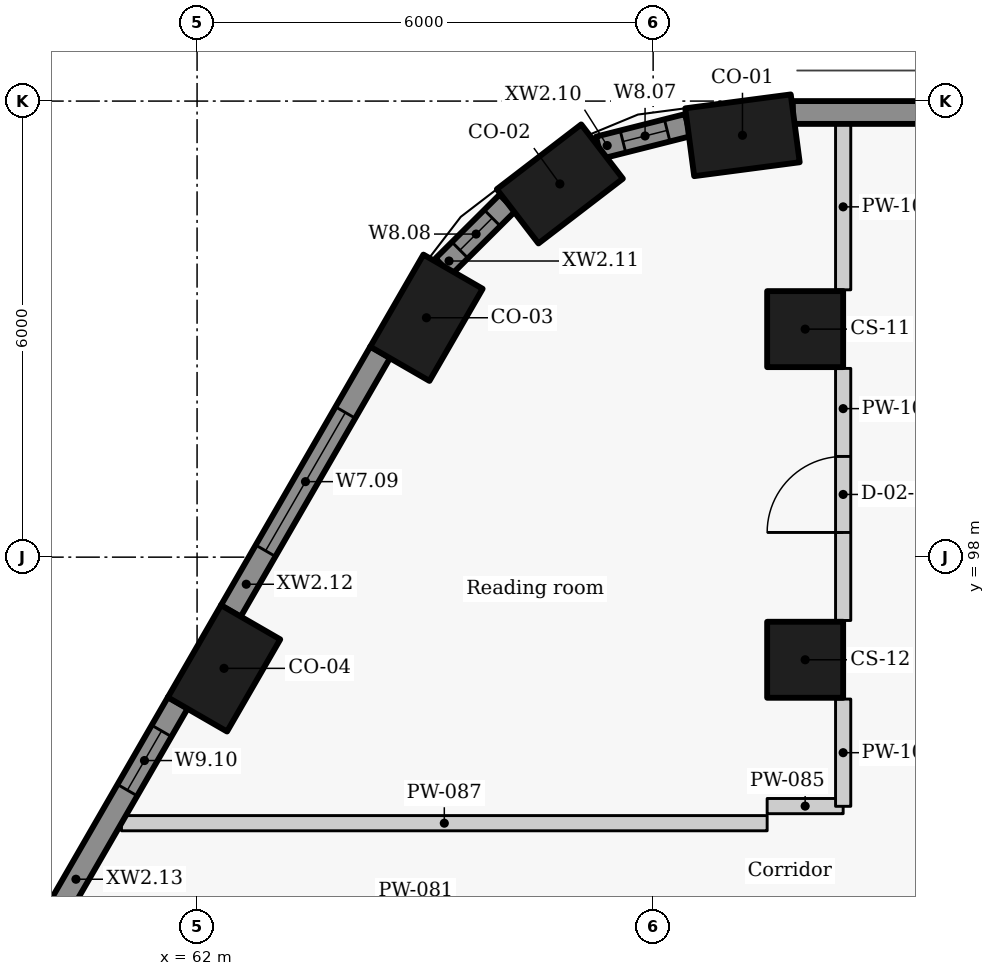
"""IFC4 building model, lengths in metres.
Left out: names, types, materials, properties, quantities, classifications, styles, units other than length and angle.
Written with IfcOpenShell. Run it as: python <this file> out.ifc"""

import sys

from ifc_helpers import new_model, si_unit, direction, frame, frame_2d, origin, origin_2d, place, context, subcontext, project, spatial, rectangle, extrude, element, fill, save


model = new_model("IFC4")
c1 = context("Model", 3, precision=1e-05, world=origin(), true_north=direction((0.0, 1.0)))
c2 = subcontext(c1, "Body", "Model", "MODEL_VIEW")
j1 = project(units=[si_unit("LENGTHUNIT", "METRE"), si_unit("PLANEANGLEUNIT", "RADIAN")], contexts=[c1])
p1 = place(None, origin())
s1 = spatial("IfcSite", under=j1, at=p1, CompositionType="ELEMENT")
p2 = place(p1, origin())
s2 = spatial("IfcBuilding", under=s1, at=p2, CompositionType="ELEMENT")
p3 = place(p2, frame((0.0, 0.0, 107.4)))
s3 = spatial("IfcBuildingStorey", under=s2, at=p3, CompositionType="ELEMENT", Elevation=107.4)
for number, where, z_axis, x_axis in (
    (1, (69.175, 103.55, 0.0), (0.0, 0.0, 1.0), (-0.991, -0.131, 0.0)),
    (2, (66.773, 102.91, 0.0), (0.0, 0.0, 1.0), (-0.793, -0.609, 0.0)),
    (3, (65.018, 101.149, 0.0), (0.0, 0.0, 1.0), (-0.5, -0.866, 0.0)),
    (4, (62.354, 96.537, 0.0), (0.0, 0.0, 1.0), (-0.5, -0.866, 0.0)),
):
    element("IfcColumn", number, at=place(p3, frame(where, z_axis=z_axis, x_axis=x_axis)), inside=s3, PredefinedType="COLUMN", context=c2, shape_type="SweptSolid", body=[
        extrude(rectangle(XDim=1.4, YDim=0.9, at=origin_2d()), origin(), (0.0, 0.0, 1.0), 3.3),
    ])
for number, where, z_axis, x_axis in (
    (5, (70.0, 101.0, 0.0), (0.0, 0.0, 1.0), (0.0, -1.0, 0.0)),
    (6, (70.0, 96.65, 0.0), (0.0, 0.0, 1.0), (0.0, -1.0, 0.0)),
):
    element("IfcColumn", number, at=place(p3, frame(where, z_axis=z_axis, x_axis=x_axis)), inside=s3, PredefinedType="COLUMN", context=c2, shape_type="SweptSolid", body=[
        extrude(rectangle(XDim=1.0, YDim=1.0, at=origin_2d()), origin(), (0.0, 0.0, 1.0), 3.3),
    ])
p4 = place(p3, frame((90.129, 103.85, 0.0), z_axis=(0.0, 0.0, 1.0), x_axis=(-1.0, 0.0, 0.0)))
e7 = element("IfcWall", 7, at=p4, inside=s3, PredefinedType="SOLIDWALL", context=c2, shape_type="SweptSolid", body=[
    extrude(rectangle(XDim=20.291, YDim=0.3, at=frame_2d((10.146, 0.0))), origin(), (0.0, 0.0, 1.0), 2.425),
])
p5 = place(p3, frame((68.456, 103.683, 0.0), z_axis=(0.0, 0.0, 1.0), x_axis=(-0.969485113966, -0.245150186208, 0.0)))
e8 = element("IfcWall", 8, at=p5, inside=s3, PredefinedType="SOLIDWALL", context=c2, shape_type="SweptSolid", body=[
    extrude(rectangle(XDim=1.208, YDim=0.3, at=frame_2d((0.604, 0.0))), origin(), (0.0, 0.0, 1.0), 2.425),
])
p6 = place(p5, frame((0.28, 0.0, 0.9)))
e9 = element("IfcOpeningElement", 9, at=p6, cuts=e8, PredefinedType="OPENING", context=c2, shape_type="SweptSolid", body=[
    extrude(rectangle(XDim=0.6, YDim=1.1, at=frame_2d((0.3, 0.55))), frame((0.0, 0.16, 0.0), z_axis=(0.0, -1.0, 0.0), x_axis=(1.0, 0.0, 0.0)), (0.0, 0.0, 1.0), 0.32),
])
p7 = place(p3, frame((66.085, 102.663, 0.0), z_axis=(0.0, 0.0, 1.0), x_axis=(-0.708951665509, -0.705257070842, 0.0)))
e10 = element("IfcWall", 10, at=p7, inside=s3, PredefinedType="SOLIDWALL", context=c2, shape_type="SweptSolid", body=[
    extrude(rectangle(XDim=1.189, YDim=0.3, at=frame_2d((0.595, 0.0))), origin(), (0.0, 0.0, 1.0), 2.425),
])
p8 = place(p7, frame((0.284, 0.0, 0.9)))
e11 = element("IfcOpeningElement", 11, at=p8, cuts=e10, PredefinedType="OPENING", context=c2, shape_type="SweptSolid", body=[
    extrude(rectangle(XDim=0.6, YDim=1.1, at=frame_2d((0.3, 0.55))), frame((0.0, 0.16, 0.0), z_axis=(0.0, -1.0, 0.0), x_axis=(1.0, 0.0, 0.0)), (0.0, 0.0, 1.0), 0.32),
])
p9 = place(p3, frame((64.41, 100.697, 0.0), z_axis=(0.0, 0.0, 1.0), x_axis=(-0.500003583557, -0.866023334807, 0.0)))
e12 = element("IfcWall", 12, at=p9, inside=s3, PredefinedType="SOLIDWALL", context=c2, shape_type="SweptSolid", body=[
    extrude(rectangle(XDim=3.934, YDim=0.3, at=frame_2d((1.967, 0.0))), origin(), (0.0, 0.0, 1.0), 2.425),
])
p10 = place(p9, frame((0.917, 0.0, 0.9)))
e13 = element("IfcOpeningElement", 13, at=p10, cuts=e12, PredefinedType="OPENING", context=c2, shape_type="SweptSolid", body=[
    extrude(rectangle(XDim=2.1, YDim=1.1, at=frame_2d((1.05, 0.55))), frame((0.0, 0.16, 0.0), z_axis=(0.0, -1.0, 0.0), x_axis=(1.0, 0.0, 0.0)), (0.0, 0.0, 1.0), 0.32),
])
p11 = place(p3, frame((61.747, 96.084, 0.0), z_axis=(0.0, 0.0, 1.0), x_axis=(-0.499957037901, -0.866050206543, 0.0)))
e14 = element("IfcWall", 14, at=p11, inside=s3, PredefinedType="SOLIDWALL", context=c2, shape_type="SweptSolid", body=[
    extrude(rectangle(XDim=3.934, YDim=0.3, at=frame_2d((1.967, 0.0))), origin(), (0.0, 0.0, 1.0), 2.425),
])
p12 = place(p11, frame((0.428, 0.0, 0.9)))
e15 = element("IfcOpeningElement", 15, at=p12, cuts=e14, PredefinedType="OPENING", context=c2, shape_type="SweptSolid", body=[
    extrude(rectangle(XDim=0.9, YDim=1.1, at=frame_2d((0.45, 0.55))), frame((0.0, 0.16, 0.0), z_axis=(0.0, -1.0, 0.0), x_axis=(1.0, 0.0, 0.0)), (0.0, 0.0, 1.0), 0.32),
])
p13 = place(p3, frame((69.5, 94.725, 0.0), z_axis=(0.0, 0.0, 1.0), x_axis=(1.0, 0.0, 0.0)))
e16 = element("IfcWall", 16, at=p13, inside=s3, PredefinedType="PARTITIONING", context=c2, shape_type="SweptSolid", body=[
    extrude(rectangle(XDim=1.0, YDim=0.2, at=frame_2d((0.5, 0.0))), origin(), (0.0, 0.0, 1.0), 2.505),
])
p14 = place(p3, frame((61.005, 94.5, 0.0), z_axis=(0.0, 0.0, 1.0), x_axis=(1.0, 0.0, 0.0)))
e17 = element("IfcWall", 17, at=p14, inside=s3, PredefinedType="PARTITIONING", context=c2, shape_type="SweptSolid", body=[
    extrude(rectangle(XDim=8.495, YDim=0.2, at=frame_2d((4.248, 0.0))), origin(), (0.0, 0.0, 1.0), 2.405),
])
p15 = place(p3, frame((70.5, 94.722, 0.0), z_axis=(0.0, 0.0, 1.0), x_axis=(0.0, 1.0, 0.0)))
e18 = element("IfcWall", 18, at=p15, inside=s3, PredefinedType="PARTITIONING", context=c2, shape_type="SweptSolid", body=[
    extrude(rectangle(XDim=1.411, YDim=0.2, at=frame_2d((0.706, 0.0))), origin(), (0.0, 0.0, 1.0), 3.025),
])
p16 = place(p3, frame((70.5, 97.167, 0.0), z_axis=(0.0, 0.0, 1.0), x_axis=(0.0, 1.0, 0.0)))
e19 = element("IfcWall", 19, at=p16, inside=s3, PredefinedType="PARTITIONING", context=c2, shape_type="SweptSolid", body=[
    extrude(rectangle(XDim=3.316, YDim=0.2, at=frame_2d((1.658, 0.0))), origin(), (0.0, 0.0, 1.0), 3.025),
])
p17 = place(p16, frame((1.158, 0.0, 0.0)))
e20 = element("IfcOpeningElement", 20, at=p17, cuts=e19, PredefinedType="OPENING", context=c2, shape_type="SweptSolid", body=[
    extrude(rectangle(XDim=1.0, YDim=2.1, at=frame_2d((0.5, 1.05))), frame((0.0, 0.11, 0.0), z_axis=(0.0, -1.0, 0.0), x_axis=(1.0, 0.0, 0.0)), (0.0, 0.0, 1.0), 0.22),
])
p18 = place(p3, frame((70.5, 101.517, 0.0), z_axis=(0.0, 0.0, 1.0), x_axis=(0.0, 1.0, 0.0)))
e21 = element("IfcWall", 21, at=p18, inside=s3, PredefinedType="PARTITIONING", context=c2, shape_type="SweptSolid", body=[
    extrude(rectangle(XDim=2.183, YDim=0.2, at=frame_2d((1.091, 0.0))), origin(), (0.0, 0.0, 1.0), 3.025),
])
p19 = place(p6, origin())
e22 = element("IfcWindow", 22, at=p19, inside=s3, PartitioningType="SINGLE_PANEL", PredefinedType="WINDOW", context=c2, shape_type="SweptSolid", body=[
    extrude(rectangle(XDim=0.6, YDim=1.1, at=frame_2d((0.3, 0.55))), frame((0.0, 0.03, 0.0), z_axis=(0.0, -1.0, 0.0), x_axis=(1.0, 0.0, 0.0)), (0.0, 0.0, 1.0), 0.06),
])
fill(e9, e22)
p20 = place(p8, origin())
e23 = element("IfcWindow", 23, at=p20, inside=s3, PartitioningType="SINGLE_PANEL", PredefinedType="WINDOW", context=c2, shape_type="SweptSolid", body=[
    extrude(rectangle(XDim=0.6, YDim=1.1, at=frame_2d((0.3, 0.55))), frame((0.0, 0.03, 0.0), z_axis=(0.0, -1.0, 0.0), x_axis=(1.0, 0.0, 0.0)), (0.0, 0.0, 1.0), 0.06),
])
fill(e11, e23)
p21 = place(p10, origin())
e24 = element("IfcWindow", 24, at=p21, inside=s3, PartitioningType="SINGLE_PANEL", PredefinedType="WINDOW", context=c2, shape_type="SweptSolid", body=[
    extrude(rectangle(XDim=2.1, YDim=1.1, at=frame_2d((1.05, 0.55))), frame((0.0, 0.03, 0.0), z_axis=(0.0, -1.0, 0.0), x_axis=(1.0, 0.0, 0.0)), (0.0, 0.0, 1.0), 0.06),
])
fill(e13, e24)
p22 = place(p12, origin())
e25 = element("IfcWindow", 25, at=p22, inside=s3, PartitioningType="SINGLE_PANEL", PredefinedType="WINDOW", context=c2, shape_type="SweptSolid", body=[
    extrude(rectangle(XDim=0.9, YDim=1.1, at=frame_2d((0.45, 0.55))), frame((0.0, 0.03, 0.0), z_axis=(0.0, -1.0, 0.0), x_axis=(1.0, 0.0, 0.0)), (0.0, 0.0, 1.0), 0.06),
])
fill(e15, e25)
p23 = place(p17, origin())
e26 = element("IfcDoor", 26, at=p23, inside=s3, OperationType="SINGLE_SWING_LEFT", PredefinedType="DOOR", context=c2, shape_type="SweptSolid", body=[
    extrude(rectangle(XDim=1.0, YDim=2.1, at=frame_2d((0.5, 1.05))), frame((0.0, 0.025, 0.0), z_axis=(0.0, -1.0, 0.0), x_axis=(1.0, 0.0, 0.0)), (0.0, 0.0, 1.0), 0.05),
])
fill(e20, e26)
save(model, sys.argv[1])
